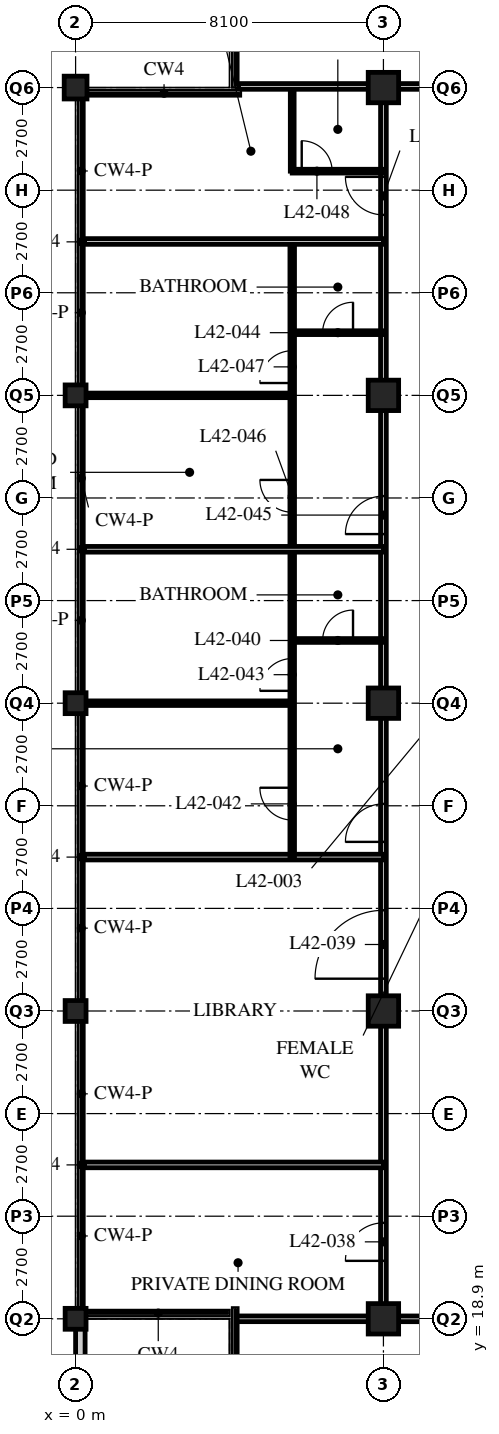
"""IFC4 building model, lengths in metres.
Left out: names, types, materials, properties, quantities, classifications, styles, units other than length and angle.
Written with IfcOpenShell. Run it as: python <this file> out.ifc"""

import sys

from ifc_helpers import new_model, si_unit, direction, frame, frame_2d, origin, origin_2d, place, context, subcontext, project, spatial, rectangle, hollow_rectangle, extrude, element, fill, save


model = new_model("IFC4")
c1 = context("Model", 3, precision=1e-05, world=origin(), true_north=direction((0.0, 1.0)))
c2 = subcontext(c1, "Body", "Model", "MODEL_VIEW")
j1 = project(units=[si_unit("LENGTHUNIT", "METRE"), si_unit("PLANEANGLEUNIT", "RADIAN")], contexts=[c1])
p1 = place(None, origin())
s1 = spatial("IfcSite", under=j1, at=p1, CompositionType="ELEMENT")
p2 = place(p1, origin())
s2 = spatial("IfcBuilding", under=s1, at=p2, CompositionType="ELEMENT")
p3 = place(p2, frame((0.0, 0.0, 165.0)))
s3 = spatial("IfcBuildingStorey", under=s2, at=p3, CompositionType="ELEMENT", Elevation=165.0)
for number, where, z_axis, x_axis in (
    (1, (0.0, 18.9, 0.0), (0.0, 0.0, 1.0), (1.0, 0.0, 0.0)),
    (2, (0.0, 27.0, 0.0), (0.0, 0.0, 1.0), (1.0, 0.0, 0.0)),
    (3, (0.0, 35.1, 0.0), (0.0, 0.0, 1.0), (1.0, 0.0, 0.0)),
    (4, (0.0, 43.2, 0.0), (0.0, 0.0, 1.0), (1.0, 0.0, 0.0)),
):
    element("IfcColumn", number, at=place(p3, frame(where, z_axis=z_axis, x_axis=x_axis)), inside=s3, PredefinedType="COLUMN", context=c2, shape_type="SweptSolid", body=[
        extrude(hollow_rectangle(XDim=0.55, YDim=0.55, WallThickness=0.04, at=origin_2d()), origin(), (0.0, 0.0, 1.0), 5.4),
    ])
p4 = place(p3, frame((0.0, 51.3, 0.0), z_axis=(0.0, 0.0, 1.0), x_axis=(1.0, 0.0, 0.0)))
e5 = element("IfcColumn", 5, at=p4, inside=s3, PredefinedType="COLUMN", context=c2, shape_type="SweptSolid", body=[
    extrude(hollow_rectangle(XDim=0.6, YDim=0.6, WallThickness=0.05, at=origin_2d()), origin(), (0.0, 0.0, 1.0), 5.4),
])
for number, where, z_axis, x_axis in (
    (6, (8.1, 18.9, 0.0), (0.0, 0.0, 1.0), (1.0, 0.0, 0.0)),
    (7, (8.1, 27.0, 0.0), (0.0, 0.0, 1.0), (1.0, 0.0, 0.0)),
    (8, (8.1, 35.1, 0.0), (0.0, 0.0, 1.0), (1.0, 0.0, 0.0)),
    (9, (8.1, 43.2, 0.0), (0.0, 0.0, 1.0), (1.0, 0.0, 0.0)),
    (10, (8.1, 51.3, 0.0), (0.0, 0.0, 1.0), (1.0, 0.0, 0.0)),
):
    element("IfcColumn", number, at=place(p3, frame(where, z_axis=z_axis, x_axis=x_axis)), inside=s3, PredefinedType="COLUMN", context=c2, shape_type="SweptSolid", body=[
        extrude(hollow_rectangle(XDim=0.8, YDim=0.8, WallThickness=0.08, at=origin_2d()), origin(), (0.0, 0.0, 1.0), 5.4),
    ])
p5 = place(p3, frame((0.125, 18.9, 0.0), z_axis=(0.0, 0.0, 1.0), x_axis=(0.0, -1.0, 0.0)))
e11 = element("IfcWall", 11, at=p5, inside=s3, PredefinedType="PARAPET", context=c2, shape_type="SweptSolid", body=[
    extrude(rectangle(XDim=5.4, YDim=0.25, at=frame_2d((2.7, 0.0))), origin(), (0.0, 0.0, 1.0), 1.38),
])
p6 = place(p3, frame((8.1, 18.9, 0.0), z_axis=(0.0, 0.0, 1.0), x_axis=(0.999999729567, -0.000735435758, 0.0)))
e12 = element("IfcWall", 12, at=p6, inside=s3, PredefinedType="PARTITIONING", context=c2, shape_type="SweptSolid", body=[
    extrude(rectangle(XDim=40.5, YDim=0.15, at=frame_2d((20.25, 0.0))), origin(), (0.0, 0.0, 1.0), 4.42),
])
p7 = place(p6, frame((4.45, 0.0, 0.0)))
e13 = element("IfcOpeningElement", 13, at=p7, cuts=e12, PredefinedType="OPENING", context=c2, shape_type="SweptSolid", body=[
    extrude(rectangle(XDim=1.0, YDim=2.1, at=frame_2d((0.5, 1.05))), frame((0.0, 0.085, 0.0), z_axis=(0.0, -1.0, 0.0), x_axis=(1.0, 0.0, 0.0)), (0.0, 0.0, 1.0), 0.17),
])
p8 = place(p6, frame((25.15, 0.0, 0.0)))
e14 = element("IfcOpeningElement", 14, at=p8, cuts=e12, PredefinedType="OPENING", context=c2, shape_type="SweptSolid", body=[
    extrude(rectangle(XDim=1.8, YDim=2.4, at=frame_2d((0.9, 1.2))), frame((0.0, 0.085, 0.0), z_axis=(0.0, -1.0, 0.0), x_axis=(1.0, 0.0, 0.0)), (0.0, 0.0, 1.0), 0.17),
])
p9 = place(p6, frame((29.875, 0.0, 0.0)))
e15 = element("IfcOpeningElement", 15, at=p9, cuts=e12, PredefinedType="OPENING", context=c2, shape_type="SweptSolid", body=[
    extrude(rectangle(XDim=1.0, YDim=2.1, at=frame_2d((0.5, 1.05))), frame((0.0, 0.085, 0.0), z_axis=(0.0, -1.0, 0.0), x_axis=(1.0, 0.0, 0.0)), (0.0, 0.0, 1.0), 0.17),
])
p10 = place(p6, frame((34.75, 0.0, 0.0)))
e16 = element("IfcOpeningElement", 16, at=p10, cuts=e12, PredefinedType="OPENING", context=c2, shape_type="SweptSolid", body=[
    extrude(rectangle(XDim=1.0, YDim=2.1, at=frame_2d((0.5, 1.05))), frame((0.0, 0.085, 0.0), z_axis=(0.0, -1.0, 0.0), x_axis=(1.0, 0.0, 0.0)), (0.0, 0.0, 1.0), 0.17),
])
p11 = place(p6, frame((1.525, 0.0, 0.0)))
e17 = element("IfcOpeningElement", 17, at=p11, cuts=e12, PredefinedType="OPENING", context=c2, shape_type="SweptSolid", body=[
    extrude(rectangle(XDim=1.0, YDim=2.1, at=frame_2d((0.5, 1.05))), frame((0.0, 0.085, 0.0), z_axis=(0.0, -1.0, 0.0), x_axis=(1.0, 0.0, 0.0)), (0.0, 0.0, 1.0), 0.17),
])
p12 = place(p6, frame((37.975, 0.0, 0.0)))
e18 = element("IfcOpeningElement", 18, at=p12, cuts=e12, PredefinedType="OPENING", context=c2, shape_type="SweptSolid", body=[
    extrude(rectangle(XDim=1.0, YDim=2.1, at=frame_2d((0.5, 1.05))), frame((0.0, 0.085, 0.0), z_axis=(0.0, -1.0, 0.0), x_axis=(1.0, 0.0, 0.0)), (0.0, 0.0, 1.0), 0.17),
])
p13 = place(p3, frame((8.1, 51.33, 0.0), z_axis=(0.0, 0.0, 1.0), x_axis=(0.999999725116, -0.000741463917, 0.0)))
e19 = element("IfcWall", 19, at=p13, inside=s3, PredefinedType="PARTITIONING", context=c2, shape_type="SweptSolid", body=[
    extrude(rectangle(XDim=40.5, YDim=0.15, at=frame_2d((20.25, 0.0))), origin(), (0.0, 0.0, 1.0), 4.42),
])
p14 = place(p13, frame((8.95, 0.0, 0.0)))
e20 = element("IfcOpeningElement", 20, at=p14, cuts=e19, PredefinedType="OPENING", context=c2, shape_type="SweptSolid", body=[
    extrude(rectangle(XDim=1.8, YDim=2.4, at=frame_2d((0.9, 1.2))), frame((0.0, 0.085, 0.0), z_axis=(0.0, -1.0, 0.0), x_axis=(1.0, 0.0, 0.0)), (0.0, 0.0, 1.0), 0.17),
])
p15 = place(p13, frame((17.05, 0.0, 0.0)))
e21 = element("IfcOpeningElement", 21, at=p15, cuts=e19, PredefinedType="OPENING", context=c2, shape_type="SweptSolid", body=[
    extrude(rectangle(XDim=1.8, YDim=2.4, at=frame_2d((0.9, 1.2))), frame((0.0, 0.085, 0.0), z_axis=(0.0, -1.0, 0.0), x_axis=(1.0, 0.0, 0.0)), (0.0, 0.0, 1.0), 0.17),
])
p16 = place(p13, frame((20.65, 0.0, 0.0)))
e22 = element("IfcOpeningElement", 22, at=p16, cuts=e19, PredefinedType="OPENING", context=c2, shape_type="SweptSolid", body=[
    extrude(rectangle(XDim=1.0, YDim=2.1, at=frame_2d((0.5, 1.05))), frame((0.0, 0.085, 0.0), z_axis=(0.0, -1.0, 0.0), x_axis=(1.0, 0.0, 0.0)), (0.0, 0.0, 1.0), 0.17),
])
p17 = place(p13, frame((28.75, 0.0, 0.0)))
e23 = element("IfcOpeningElement", 23, at=p17, cuts=e19, PredefinedType="OPENING", context=c2, shape_type="SweptSolid", body=[
    extrude(rectangle(XDim=1.0, YDim=2.1, at=frame_2d((0.5, 1.05))), frame((0.0, 0.085, 0.0), z_axis=(0.0, -1.0, 0.0), x_axis=(1.0, 0.0, 0.0)), (0.0, 0.0, 1.0), 0.17),
])
p18 = place(p13, frame((37.975, 0.0, 0.0)))
e24 = element("IfcOpeningElement", 24, at=p18, cuts=e19, PredefinedType="OPENING", context=c2, shape_type="SweptSolid", body=[
    extrude(rectangle(XDim=1.0, YDim=2.1, at=frame_2d((0.5, 1.05))), frame((0.0, 0.085, 0.0), z_axis=(0.0, -1.0, 0.0), x_axis=(1.0, 0.0, 0.0)), (0.0, 0.0, 1.0), 0.17),
])
p19 = place(p13, frame((1.525, 0.0, 0.0)))
e25 = element("IfcOpeningElement", 25, at=p19, cuts=e19, PredefinedType="OPENING", context=c2, shape_type="SweptSolid", body=[
    extrude(rectangle(XDim=1.0, YDim=2.1, at=frame_2d((0.5, 1.05))), frame((0.0, 0.085, 0.0), z_axis=(0.0, -1.0, 0.0), x_axis=(1.0, 0.0, 0.0)), (0.0, 0.0, 1.0), 0.17),
])
p20 = place(p3, frame((8.1, 18.9, 0.0), z_axis=(0.0, 0.0, 1.0), x_axis=(0.0, 1.0, 0.0)))
e26 = element("IfcWall", 26, at=p20, inside=s3, PredefinedType="PARTITIONING", context=c2, shape_type="SweptSolid", body=[
    extrude(rectangle(XDim=32.43, YDim=0.15, at=frame_2d((16.215, 0.0))), origin(), (0.0, 0.0, 1.0), 4.42),
])
p21 = place(p20, frame((1.525, 0.0, 0.0)))
e27 = element("IfcOpeningElement", 27, at=p21, cuts=e26, PredefinedType="OPENING", context=c2, shape_type="SweptSolid", body=[
    extrude(rectangle(XDim=1.0, YDim=2.1, at=frame_2d((0.5, 1.05))), frame((0.0, 0.085, 0.0), z_axis=(0.0, -1.0, 0.0), x_axis=(1.0, 0.0, 0.0)), (0.0, 0.0, 1.0), 0.17),
])
p22 = place(p20, frame((8.95, 0.0, 0.0)))
e28 = element("IfcOpeningElement", 28, at=p22, cuts=e26, PredefinedType="OPENING", context=c2, shape_type="SweptSolid", body=[
    extrude(rectangle(XDim=1.8, YDim=2.4, at=frame_2d((0.9, 1.2))), frame((0.0, 0.085, 0.0), z_axis=(0.0, -1.0, 0.0), x_axis=(1.0, 0.0, 0.0)), (0.0, 0.0, 1.0), 0.17),
])
p23 = place(p20, frame((12.55, 0.0, 0.0)))
e29 = element("IfcOpeningElement", 29, at=p23, cuts=e26, PredefinedType="OPENING", context=c2, shape_type="SweptSolid", body=[
    extrude(rectangle(XDim=1.0, YDim=2.1, at=frame_2d((0.5, 1.05))), frame((0.0, 0.085, 0.0), z_axis=(0.0, -1.0, 0.0), x_axis=(1.0, 0.0, 0.0)), (0.0, 0.0, 1.0), 0.17),
])
p24 = place(p20, frame((20.65, 0.0, 0.0)))
e30 = element("IfcOpeningElement", 30, at=p24, cuts=e26, PredefinedType="OPENING", context=c2, shape_type="SweptSolid", body=[
    extrude(rectangle(XDim=1.0, YDim=2.1, at=frame_2d((0.5, 1.05))), frame((0.0, 0.085, 0.0), z_axis=(0.0, -1.0, 0.0), x_axis=(1.0, 0.0, 0.0)), (0.0, 0.0, 1.0), 0.17),
])
p25 = place(p20, frame((29.05, 0.0, 0.0)))
e31 = element("IfcOpeningElement", 31, at=p25, cuts=e26, PredefinedType="OPENING", context=c2, shape_type="SweptSolid", body=[
    extrude(rectangle(XDim=1.0, YDim=2.1, at=frame_2d((0.5, 1.05))), frame((0.0, 0.085, 0.0), z_axis=(0.0, -1.0, 0.0), x_axis=(1.0, 0.0, 0.0)), (0.0, 0.0, 1.0), 0.17),
])
for number, where, z_axis, x_axis in (
    (32, (8.1, 22.95, 0.0), (0.0, 0.0, 1.0), (-1.0, 0.0, 0.0)),
    (33, (8.1, 31.05, 0.0), (0.0, 0.0, 1.0), (-1.0, 0.0, 0.0)),
):
    element("IfcWall", number, at=place(p3, frame(where, z_axis=z_axis, x_axis=x_axis)), inside=s3, PredefinedType="PARTITIONING", context=c2, shape_type="SweptSolid", body=[
        extrude(rectangle(XDim=7.865, YDim=0.15, at=frame_2d((3.932, 0.0))), origin(), (0.0, 0.0, 1.0), 5.19),
    ])
p26 = place(p3, frame((5.7, 31.05, 0.0), z_axis=(0.0, 0.0, 1.0), x_axis=(0.0, 1.0, 0.0)))
e34 = element("IfcWall", 34, at=p26, inside=s3, PredefinedType="PARTITIONING", context=c2, shape_type="SweptSolid", body=[
    extrude(rectangle(XDim=16.2, YDim=0.12, at=frame_2d((8.1, 0.0))), origin(), (0.0, 0.0, 1.0), 5.19),
])
p27 = place(p26, frame((0.975, 0.0, 0.0)))
e35 = element("IfcOpeningElement", 35, at=p27, cuts=e34, PredefinedType="OPENING", context=c2, shape_type="SweptSolid", body=[
    extrude(rectangle(XDim=0.85, YDim=2.1, at=frame_2d((0.425, 1.05))), frame((0.0, 0.07, 0.0), z_axis=(0.0, -1.0, 0.0), x_axis=(1.0, 0.0, 0.0)), (0.0, 0.0, 1.0), 0.14),
])
p28 = place(p26, frame((4.375, 0.0, 0.0)))
e36 = element("IfcOpeningElement", 36, at=p28, cuts=e34, PredefinedType="OPENING", context=c2, shape_type="SweptSolid", body=[
    extrude(rectangle(XDim=0.85, YDim=2.1, at=frame_2d((0.425, 1.05))), frame((0.0, 0.07, 0.0), z_axis=(0.0, -1.0, 0.0), x_axis=(1.0, 0.0, 0.0)), (0.0, 0.0, 1.0), 0.14),
])
p29 = place(p26, frame((9.075, 0.0, 0.0)))
e37 = element("IfcOpeningElement", 37, at=p29, cuts=e34, PredefinedType="OPENING", context=c2, shape_type="SweptSolid", body=[
    extrude(rectangle(XDim=0.85, YDim=2.1, at=frame_2d((0.425, 1.05))), frame((0.0, 0.07, 0.0), z_axis=(0.0, -1.0, 0.0), x_axis=(1.0, 0.0, 0.0)), (0.0, 0.0, 1.0), 0.14),
])
p30 = place(p26, frame((12.475, 0.0, 0.0)))
e38 = element("IfcOpeningElement", 38, at=p30, cuts=e34, PredefinedType="OPENING", context=c2, shape_type="SweptSolid", body=[
    extrude(rectangle(XDim=0.85, YDim=2.1, at=frame_2d((0.425, 1.05))), frame((0.0, 0.07, 0.0), z_axis=(0.0, -1.0, 0.0), x_axis=(1.0, 0.0, 0.0)), (0.0, 0.0, 1.0), 0.14),
])
p31 = place(p3, frame((8.1, 36.75, 0.0), z_axis=(0.0, 0.0, 1.0), x_axis=(-1.0, 0.0, 0.0)))
e39 = element("IfcWall", 39, at=p31, inside=s3, PredefinedType="PARTITIONING", context=c2, shape_type="SweptSolid", body=[
    extrude(rectangle(XDim=2.4, YDim=0.1, at=frame_2d((1.2, 0.0))), origin(), (0.0, 0.0, 1.0), 5.19),
])
p32 = place(p31, frame((0.8, 0.0, 0.0)))
e40 = element("IfcOpeningElement", 40, at=p32, cuts=e39, PredefinedType="OPENING", context=c2, shape_type="SweptSolid", body=[
    extrude(rectangle(XDim=0.8, YDim=2.1, at=frame_2d((0.4, 1.05))), frame((0.0, 0.06, 0.0), z_axis=(0.0, -1.0, 0.0), x_axis=(1.0, 0.0, 0.0)), (0.0, 0.0, 1.0), 0.12),
])
p33 = place(p3, frame((5.7, 35.1, 0.0), z_axis=(0.0, 0.0, 1.0), x_axis=(-1.0, 0.0, 0.0)))
e41 = element("IfcWall", 41, at=p33, inside=s3, PredefinedType="PARTITIONING", context=c2, shape_type="SweptSolid", body=[
    extrude(rectangle(XDim=5.4, YDim=0.12, at=frame_2d((2.7, 0.0))), origin(), (0.0, 0.0, 1.0), 4.42),
])
p34 = place(p3, frame((8.1, 39.15, 0.0), z_axis=(0.0, 0.0, 1.0), x_axis=(-1.0, 0.0, 0.0)))
e42 = element("IfcWall", 42, at=p34, inside=s3, PredefinedType="PARTITIONING", context=c2, shape_type="SweptSolid", body=[
    extrude(rectangle(XDim=7.865, YDim=0.15, at=frame_2d((3.932, 0.0))), origin(), (0.0, 0.0, 1.0), 5.19),
])
p35 = place(p3, frame((8.1, 44.85, 0.0), z_axis=(0.0, 0.0, 1.0), x_axis=(-1.0, 0.0, 0.0)))
e43 = element("IfcWall", 43, at=p35, inside=s3, PredefinedType="PARTITIONING", context=c2, shape_type="SweptSolid", body=[
    extrude(rectangle(XDim=2.4, YDim=0.1, at=frame_2d((1.2, 0.0))), origin(), (0.0, 0.0, 1.0), 5.19),
])
p36 = place(p35, frame((0.8, 0.0, 0.0)))
e44 = element("IfcOpeningElement", 44, at=p36, cuts=e43, PredefinedType="OPENING", context=c2, shape_type="SweptSolid", body=[
    extrude(rectangle(XDim=0.8, YDim=2.1, at=frame_2d((0.4, 1.05))), frame((0.0, 0.06, 0.0), z_axis=(0.0, -1.0, 0.0), x_axis=(1.0, 0.0, 0.0)), (0.0, 0.0, 1.0), 0.12),
])
p37 = place(p3, frame((5.7, 43.2, 0.0), z_axis=(0.0, 0.0, 1.0), x_axis=(-1.0, 0.0, 0.0)))
e45 = element("IfcWall", 45, at=p37, inside=s3, PredefinedType="PARTITIONING", context=c2, shape_type="SweptSolid", body=[
    extrude(rectangle(XDim=5.4, YDim=0.12, at=frame_2d((2.7, 0.0))), origin(), (0.0, 0.0, 1.0), 4.42),
])
p38 = place(p3, frame((8.1, 47.25, 0.0), z_axis=(0.0, 0.0, 1.0), x_axis=(-1.0, 0.0, 0.0)))
e46 = element("IfcWall", 46, at=p38, inside=s3, PredefinedType="PARTITIONING", context=c2, shape_type="SweptSolid", body=[
    extrude(rectangle(XDim=7.865, YDim=0.15, at=frame_2d((3.932, 0.0))), origin(), (0.0, 0.0, 1.0), 5.19),
])
p39 = place(p3, frame((5.7, 49.1, 0.0), z_axis=(0.0, 0.0, 1.0), x_axis=(0.0, 1.0, 0.0)))
e47 = element("IfcWall", 47, at=p39, inside=s3, PredefinedType="PARTITIONING", context=c2, shape_type="SweptSolid", body=[
    extrude(rectangle(XDim=2.23, YDim=0.1, at=frame_2d((1.115, 0.0))), origin(), (0.0, 0.0, 1.0), 5.19),
])
p40 = place(p3, frame((8.1, 49.1, 0.0), z_axis=(0.0, 0.0, 1.0), x_axis=(-1.0, 0.0, 0.0)))
e48 = element("IfcWall", 48, at=p40, inside=s3, PredefinedType="PARTITIONING", context=c2, shape_type="SweptSolid", body=[
    extrude(rectangle(XDim=2.4, YDim=0.1, at=frame_2d((1.2, 0.0))), origin(), (0.0, 0.0, 1.0), 5.19),
])
p41 = place(p40, frame((1.35, 0.0, 0.0)))
e49 = element("IfcOpeningElement", 49, at=p41, cuts=e48, PredefinedType="OPENING", context=c2, shape_type="SweptSolid", body=[
    extrude(rectangle(XDim=0.8, YDim=2.1, at=frame_2d((0.4, 1.05))), frame((0.0, 0.06, 0.0), z_axis=(0.0, -1.0, 0.0), x_axis=(1.0, 0.0, 0.0)), (0.0, 0.0, 1.0), 0.12),
])
p42 = place(p3, frame((4.217, 18.9, 0.0), z_axis=(0.0, 0.0, 1.0), x_axis=(1.0, 0.0, 0.0)))
e50 = element("IfcWall", 50, at=p42, inside=s3, PredefinedType="PARTITIONING", context=c2, shape_type="SweptSolid", body=[
    extrude(rectangle(XDim=3.883, YDim=0.15, at=frame_2d((1.941, 0.0))), origin(), (0.0, 0.0, 1.0), 4.42),
])
p43 = place(p3, frame((4.285, 51.33, 0.0), z_axis=(0.0, 0.0, 1.0), x_axis=(1.0, 0.0, 0.0)))
e51 = element("IfcWall", 51, at=p43, inside=s3, PredefinedType="PARTITIONING", context=c2, shape_type="SweptSolid", body=[
    extrude(rectangle(XDim=3.815, YDim=0.15, at=frame_2d((1.907, 0.0))), origin(), (0.0, 0.0, 1.0), 4.42),
])
p44 = place(p21, origin())
e52 = element("IfcDoor", 52, at=p44, inside=s3, OperationType="SINGLE_SWING_LEFT", PredefinedType="DOOR", context=c2, shape_type="SweptSolid", body=[
    extrude(rectangle(XDim=1.0, YDim=2.1, at=frame_2d((0.5, 1.05))), frame((0.0, 0.025, 0.0), z_axis=(0.0, -1.0, 0.0), x_axis=(1.0, 0.0, 0.0)), (0.0, 0.0, 1.0), 0.05),
])
fill(e27, e52)
p45 = place(p22, origin())
e53 = element("IfcDoor", 53, at=p45, inside=s3, OperationType="DOUBLE_DOOR_SINGLE_SWING", PredefinedType="DOOR", context=c2, shape_type="SweptSolid", body=[
    extrude(rectangle(XDim=1.8, YDim=2.4, at=frame_2d((0.9, 1.2))), frame((0.0, 0.025, 0.0), z_axis=(0.0, -1.0, 0.0), x_axis=(1.0, 0.0, 0.0)), (0.0, 0.0, 1.0), 0.05),
])
fill(e28, e53)
p46 = place(p32, origin())
e54 = element("IfcDoor", 54, at=p46, inside=s3, OperationType="SINGLE_SWING_RIGHT", PredefinedType="DOOR", context=c2, shape_type="SweptSolid", body=[
    extrude(rectangle(XDim=0.8, YDim=2.1, at=frame_2d((0.4, 1.05))), frame((0.0, 0.025, 0.0), z_axis=(0.0, -1.0, 0.0), x_axis=(1.0, 0.0, 0.0)), (0.0, 0.0, 1.0), 0.05),
])
fill(e40, e54)
p47 = place(p23, origin())
e55 = element("IfcDoor", 55, at=p47, inside=s3, OperationType="SINGLE_SWING_LEFT", PredefinedType="DOOR", context=c2, shape_type="SweptSolid", body=[
    extrude(rectangle(XDim=1.0, YDim=2.1, at=frame_2d((0.5, 1.05))), frame((0.0, 0.025, 0.0), z_axis=(0.0, -1.0, 0.0), x_axis=(1.0, 0.0, 0.0)), (0.0, 0.0, 1.0), 0.05),
])
fill(e29, e55)
p48 = place(p27, origin())
e56 = element("IfcDoor", 56, at=p48, inside=s3, OperationType="SINGLE_SWING_RIGHT", PredefinedType="DOOR", context=c2, shape_type="SweptSolid", body=[
    extrude(rectangle(XDim=0.85, YDim=2.1, at=frame_2d((0.425, 1.05))), frame((0.0, 0.025, 0.0), z_axis=(0.0, -1.0, 0.0), x_axis=(1.0, 0.0, 0.0)), (0.0, 0.0, 1.0), 0.05),
])
fill(e35, e56)
p49 = place(p28, origin())
e57 = element("IfcDoor", 57, at=p49, inside=s3, OperationType="SINGLE_SWING_LEFT", PredefinedType="DOOR", context=c2, shape_type="SweptSolid", body=[
    extrude(rectangle(XDim=0.85, YDim=2.1, at=frame_2d((0.425, 1.05))), frame((0.0, 0.025, 0.0), z_axis=(0.0, -1.0, 0.0), x_axis=(1.0, 0.0, 0.0)), (0.0, 0.0, 1.0), 0.05),
])
fill(e36, e57)
p50 = place(p36, origin())
e58 = element("IfcDoor", 58, at=p50, inside=s3, OperationType="SINGLE_SWING_RIGHT", PredefinedType="DOOR", context=c2, shape_type="SweptSolid", body=[
    extrude(rectangle(XDim=0.8, YDim=2.1, at=frame_2d((0.4, 1.05))), frame((0.0, 0.025, 0.0), z_axis=(0.0, -1.0, 0.0), x_axis=(1.0, 0.0, 0.0)), (0.0, 0.0, 1.0), 0.05),
])
fill(e44, e58)
p51 = place(p24, origin())
e59 = element("IfcDoor", 59, at=p51, inside=s3, OperationType="SINGLE_SWING_LEFT", PredefinedType="DOOR", context=c2, shape_type="SweptSolid", body=[
    extrude(rectangle(XDim=1.0, YDim=2.1, at=frame_2d((0.5, 1.05))), frame((0.0, 0.025, 0.0), z_axis=(0.0, -1.0, 0.0), x_axis=(1.0, 0.0, 0.0)), (0.0, 0.0, 1.0), 0.05),
])
fill(e30, e59)
p52 = place(p29, origin())
e60 = element("IfcDoor", 60, at=p52, inside=s3, OperationType="SINGLE_SWING_RIGHT", PredefinedType="DOOR", context=c2, shape_type="SweptSolid", body=[
    extrude(rectangle(XDim=0.85, YDim=2.1, at=frame_2d((0.425, 1.05))), frame((0.0, 0.025, 0.0), z_axis=(0.0, -1.0, 0.0), x_axis=(1.0, 0.0, 0.0)), (0.0, 0.0, 1.0), 0.05),
])
fill(e37, e60)
p53 = place(p30, origin())
e61 = element("IfcDoor", 61, at=p53, inside=s3, OperationType="SINGLE_SWING_LEFT", PredefinedType="DOOR", context=c2, shape_type="SweptSolid", body=[
    extrude(rectangle(XDim=0.85, YDim=2.1, at=frame_2d((0.425, 1.05))), frame((0.0, 0.025, 0.0), z_axis=(0.0, -1.0, 0.0), x_axis=(1.0, 0.0, 0.0)), (0.0, 0.0, 1.0), 0.05),
])
fill(e38, e61)
p54 = place(p41, origin())
e62 = element("IfcDoor", 62, at=p54, inside=s3, OperationType="SINGLE_SWING_LEFT", PredefinedType="DOOR", context=c2, shape_type="SweptSolid", body=[
    extrude(rectangle(XDim=0.8, YDim=2.1, at=frame_2d((0.4, 1.05))), frame((0.0, 0.025, 0.0), z_axis=(0.0, -1.0, 0.0), x_axis=(1.0, 0.0, 0.0)), (0.0, 0.0, 1.0), 0.05),
])
fill(e49, e62)
p55 = place(p25, origin())
e63 = element("IfcDoor", 63, at=p55, inside=s3, OperationType="SINGLE_SWING_RIGHT", PredefinedType="DOOR", context=c2, shape_type="SweptSolid", body=[
    extrude(rectangle(XDim=1.0, YDim=2.1, at=frame_2d((0.5, 1.05))), frame((0.0, 0.025, 0.0), z_axis=(0.0, -1.0, 0.0), x_axis=(1.0, 0.0, 0.0)), (0.0, 0.0, 1.0), 0.05),
])
fill(e31, e63)
save(model, sys.argv[1])
